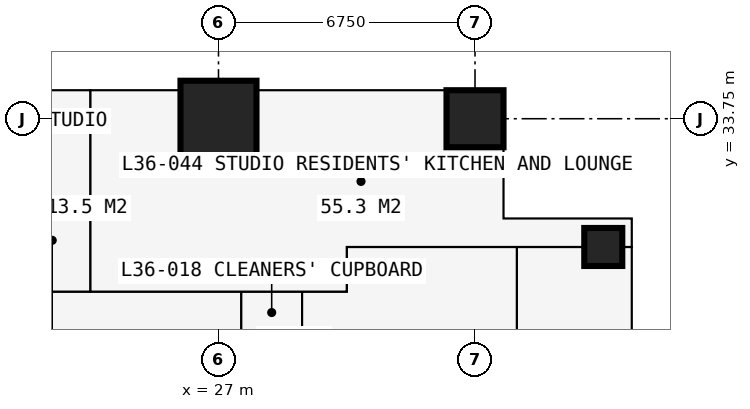
"""IFC4 building model, lengths in metres.
Left out: names, types, materials, properties, quantities, classifications, styles, units other than length and angle.
Written with IfcOpenShell. Run it as: python <this file> out.ifc"""

import sys

from ifc_helpers import new_model, si_unit, direction, frame, frame_2d, origin, origin_2d, place, context, subcontext, project, spatial, rectangle, extrude, element, fill, save


model = new_model("IFC4")
c1 = context("Model", 3, precision=1e-05, world=origin(), true_north=direction((0.0, 1.0)))
c2 = subcontext(c1, "Body", "Model", "MODEL_VIEW")
j1 = project(units=[si_unit("LENGTHUNIT", "METRE"), si_unit("PLANEANGLEUNIT", "RADIAN")], contexts=[c1])
p1 = place(None, origin())
s1 = spatial("IfcSite", under=j1, at=p1, CompositionType="ELEMENT")
p2 = place(p1, origin())
s2 = spatial("IfcBuilding", under=s1, at=p2, CompositionType="ELEMENT")
p3 = place(p2, frame((0.0, 0.0, 134.1)))
s3 = spatial("IfcBuildingStorey", under=s2, at=p3, CompositionType="ELEMENT", Elevation=134.1)
p4 = place(p3, frame((27.0, 33.75, 0.0), z_axis=(0.0, 0.0, 1.0), x_axis=(1.0, 0.0, 0.0)))
e1 = element("IfcColumn", 1, at=p4, inside=s3, PredefinedType="COLUMN", context=c2, shape_type="SweptSolid", body=[
    extrude(rectangle(XDim=2.0, YDim=2.0, at=origin_2d()), origin(), (0.0, 0.0, 1.0), 3.6),
])
p5 = place(p3, frame((33.75, 33.75, 0.0), z_axis=(0.0, 0.0, 1.0), x_axis=(1.0, 0.0, 0.0)))
e2 = element("IfcColumn", 2, at=p5, inside=s3, PredefinedType="COLUMN", context=c2, shape_type="SweptSolid", body=[
    extrude(rectangle(XDim=1.5, YDim=1.5, at=origin_2d()), origin(), (0.0, 0.0, 1.0), 3.6),
])
p6 = place(p3, frame((37.125, 30.375, 0.0), z_axis=(0.0, 0.0, 1.0), x_axis=(1.0, 0.0, 0.0)))
e3 = element("IfcColumn", 3, at=p6, inside=s3, PredefinedType="COLUMN", context=c2, shape_type="SweptSolid", body=[
    extrude(rectangle(XDim=1.0, YDim=1.0, at=origin_2d()), origin(), (0.0, 0.0, 1.0), 3.6),
])
p7 = place(p3, frame((37.875, 27.75, 0.0), z_axis=(0.0, 0.0, 1.0), x_axis=(0.0, 1.0, 0.0)))
e4 = element("IfcWall", 4, at=p7, inside=s3, PredefinedType="SOLIDWALL", context=c2, shape_type="SweptSolid", body=[
    extrude(rectangle(XDim=3.375, YDim=0.3, at=frame_2d((1.688, 0.0))), origin(), (0.0, 0.0, 1.0), 3.3),
])
p8 = place(p7, frame((0.788, 0.0, 0.6)))
e5 = element("IfcOpeningElement", 5, at=p8, cuts=e4, PredefinedType="OPENING", context=c2, shape_type="SweptSolid", body=[
    extrude(rectangle(XDim=1.8, YDim=2.1, at=frame_2d((0.9, 1.05))), frame((0.0, 0.16, 0.0), z_axis=(0.0, -1.0, 0.0), x_axis=(1.0, 0.0, 0.0)), (0.0, 0.0, 1.0), 0.32),
])
p9 = place(p3, frame((37.875, 31.125, 0.0), z_axis=(0.0, 0.0, 1.0), x_axis=(-1.0, 0.0, 0.0)))
e6 = element("IfcWall", 6, at=p9, inside=s3, PredefinedType="SOLIDWALL", context=c2, shape_type="SweptSolid", body=[
    extrude(rectangle(XDim=3.375, YDim=0.3, at=frame_2d((1.688, 0.0))), origin(), (0.0, 0.0, 1.0), 3.3),
])
p10 = place(p9, frame((0.788, 0.0, 0.6)))
e7 = element("IfcOpeningElement", 7, at=p10, cuts=e6, PredefinedType="OPENING", context=c2, shape_type="SweptSolid", body=[
    extrude(rectangle(XDim=1.8, YDim=2.1, at=frame_2d((0.9, 1.05))), frame((0.0, 0.16, 0.0), z_axis=(0.0, -1.0, 0.0), x_axis=(1.0, 0.0, 0.0)), (0.0, 0.0, 1.0), 0.32),
])
p11 = place(p3, frame((34.5, 31.125, 0.0), z_axis=(0.0, 0.0, 1.0), x_axis=(0.0, 1.0, 0.0)))
e8 = element("IfcWall", 8, at=p11, inside=s3, PredefinedType="SOLIDWALL", context=c2, shape_type="SweptSolid", body=[
    extrude(rectangle(XDim=3.375, YDim=0.3, at=frame_2d((1.688, 0.0))), origin(), (0.0, 0.0, 1.0), 3.3),
])
p12 = place(p11, frame((0.268, 0.0, 0.9)))
e9 = element("IfcOpeningElement", 9, at=p12, cuts=e8, PredefinedType="OPENING", context=c2, shape_type="SweptSolid", body=[
    extrude(rectangle(XDim=1.5, YDim=1.8, at=frame_2d((0.75, 0.9))), frame((0.0, 0.16, 0.0), z_axis=(0.0, -1.0, 0.0), x_axis=(1.0, 0.0, 0.0)), (0.0, 0.0, 1.0), 0.32),
])
p13 = place(p3, frame((20.25, 34.5, 0.0), z_axis=(0.0, 0.0, 1.0), x_axis=(1.0, 0.0, 0.0)))
e10 = element("IfcWall", 10, at=p13, inside=s3, PredefinedType="SOLIDWALL", context=c2, shape_type="SweptSolid", body=[
    extrude(rectangle(XDim=6.75, YDim=0.15, at=frame_2d((3.375, 0.0))), origin(), (0.0, 0.0, 1.0), 3.3),
])
p14 = place(p13, frame((0.863, 0.0, 0.0)))
e11 = element("IfcOpeningElement", 11, at=p14, cuts=e10, PredefinedType="OPENING", context=c2, shape_type="SweptSolid", body=[
    extrude(rectangle(XDim=1.0, YDim=2.2, at=frame_2d((0.5, 1.1))), frame((0.0, 0.085, 0.0), z_axis=(0.0, -1.0, 0.0), x_axis=(1.0, 0.0, 0.0)), (0.0, 0.0, 1.0), 0.17),
])
p15 = place(p13, frame((1.975, 0.0, 0.9)))
e12 = element("IfcOpeningElement", 12, at=p15, cuts=e10, PredefinedType="OPENING", context=c2, shape_type="SweptSolid", body=[
    extrude(rectangle(XDim=1.2, YDim=1.8, at=frame_2d((0.6, 0.9))), frame((0.0, 0.085, 0.0), z_axis=(0.0, -1.0, 0.0), x_axis=(1.0, 0.0, 0.0)), (0.0, 0.0, 1.0), 0.17),
])
p16 = place(p13, frame((4.621, 0.0, 0.0)))
e13 = element("IfcOpeningElement", 13, at=p16, cuts=e10, PredefinedType="OPENING", context=c2, shape_type="SweptSolid", body=[
    extrude(rectangle(XDim=1.0, YDim=2.2, at=frame_2d((0.5, 1.1))), frame((0.0, 0.085, 0.0), z_axis=(0.0, -1.0, 0.0), x_axis=(1.0, 0.0, 0.0)), (0.0, 0.0, 1.0), 0.17),
])
p17 = place(p13, frame((3.592, 0.0, 0.9)))
e14 = element("IfcOpeningElement", 14, at=p17, cuts=e10, PredefinedType="OPENING", context=c2, shape_type="SweptSolid", body=[
    extrude(rectangle(XDim=0.9, YDim=1.8, at=frame_2d((0.45, 0.9))), frame((0.0, 0.085, 0.0), z_axis=(0.0, -1.0, 0.0), x_axis=(1.0, 0.0, 0.0)), (0.0, 0.0, 1.0), 0.17),
])
p18 = place(p3, frame((23.625, 34.6, 0.0), z_axis=(0.0, 0.0, 1.0), x_axis=(0.0, 1.0, 0.0)))
e15 = element("IfcWall", 15, at=p18, inside=s3, PredefinedType="USERDEFINED", context=c2, shape_type="SweptSolid", body=[
    extrude(rectangle(XDim=2.2, YDim=1.0, at=frame_2d((1.1, 0.0))), origin(), (0.0, 0.0, 1.0), 0.9),
])
p19 = place(p3, frame((11.3, 29.2, 0.0), z_axis=(0.0, 0.0, 1.0), x_axis=(1.0, 0.0, 0.0)))
e16 = element("IfcWall", 16, at=p19, inside=s3, PredefinedType="PARTITIONING", context=c2, shape_type="SweptSolid", body=[
    extrude(rectangle(XDim=19.075, YDim=0.15, at=frame_2d((9.538, 0.0))), origin(), (0.0, 0.0, 1.0), 3.3),
])
p20 = place(p19, frame((5.825, 0.0, 0.0)))
e17 = element("IfcOpeningElement", 17, at=p20, cuts=e16, PredefinedType="OPENING", context=c2, shape_type="SweptSolid", body=[
    extrude(rectangle(XDim=0.95, YDim=2.2, at=frame_2d((0.475, 1.1))), frame((0.0, 0.085, 0.0), z_axis=(0.0, -1.0, 0.0), x_axis=(1.0, 0.0, 0.0)), (0.0, 0.0, 1.0), 0.17),
])
p21 = place(p19, frame((9.2, 0.0, 0.0)))
e18 = element("IfcOpeningElement", 18, at=p21, cuts=e16, PredefinedType="OPENING", context=c2, shape_type="SweptSolid", body=[
    extrude(rectangle(XDim=0.95, YDim=2.2, at=frame_2d((0.475, 1.1))), frame((0.0, 0.085, 0.0), z_axis=(0.0, -1.0, 0.0), x_axis=(1.0, 0.0, 0.0)), (0.0, 0.0, 1.0), 0.17),
])
p22 = place(p19, frame((0.6, 0.0, 0.0)))
e19 = element("IfcOpeningElement", 19, at=p22, cuts=e16, PredefinedType="OPENING", context=c2, shape_type="SweptSolid", body=[
    extrude(rectangle(XDim=1.0, YDim=2.2, at=frame_2d((0.5, 1.1))), frame((0.0, 0.085, 0.0), z_axis=(0.0, -1.0, 0.0), x_axis=(1.0, 0.0, 0.0)), (0.0, 0.0, 1.0), 0.17),
])
p23 = place(p3, frame((21.625, 31.4, 0.0), z_axis=(0.0, 0.0, 1.0), x_axis=(1.0, 0.0, 0.0)))
e20 = element("IfcWall", 20, at=p23, inside=s3, PredefinedType="PARTITIONING", context=c2, shape_type="SweptSolid", body=[
    extrude(rectangle(XDim=2.0, YDim=0.1, at=frame_2d((1.0, 0.0))), origin(), (0.0, 0.0, 1.0), 3.3),
])
p24 = place(p3, frame((23.625, 29.2, 0.0), z_axis=(0.0, 0.0, 1.0), x_axis=(0.0, 1.0, 0.0)))
e21 = element("IfcWall", 21, at=p24, inside=s3, PredefinedType="PARTITIONING", context=c2, shape_type="SweptSolid", body=[
    extrude(rectangle(XDim=5.284, YDim=0.15, at=frame_2d((2.642, 0.0))), origin(), (0.0, 0.0, 1.0), 3.3),
])
p25 = place(p3, frame((27.6, 27.6, 0.0), z_axis=(0.0, 0.0, 1.0), x_axis=(0.0, 1.0, 0.0)))
e22 = element("IfcWall", 22, at=p25, inside=s3, PredefinedType="PARTITIONING", context=c2, shape_type="SweptSolid", body=[
    extrude(rectangle(XDim=1.6, YDim=0.15, at=frame_2d((0.8, 0.0))), origin(), (0.0, 0.0, 1.0), 3.3),
])
p26 = place(p25, frame((0.3, 0.0, 0.0)))
e23 = element("IfcOpeningElement", 23, at=p26, cuts=e22, PredefinedType="OPENING", context=c2, shape_type="SweptSolid", body=[
    extrude(rectangle(XDim=0.95, YDim=2.2, at=frame_2d((0.475, 1.1))), frame((0.0, 0.085, 0.0), z_axis=(0.0, -1.0, 0.0), x_axis=(1.0, 0.0, 0.0)), (0.0, 0.0, 1.0), 0.17),
])
p27 = place(p3, frame((29.2, 11.3, 0.0), z_axis=(0.0, 0.0, 1.0), x_axis=(0.0, 1.0, 0.0)))
e24 = element("IfcWall", 24, at=p27, inside=s3, PredefinedType="PARTITIONING", context=c2, shape_type="SweptSolid", body=[
    extrude(rectangle(XDim=17.9, YDim=0.2, at=frame_2d((8.95, 0.0))), origin(), (0.0, 0.0, 1.0), 3.3),
])
p28 = place(p27, frame((8.35, 0.0, 0.0)))
e25 = element("IfcOpeningElement", 25, at=p28, cuts=e24, PredefinedType="OPENING", context=c2, shape_type="SweptSolid", body=[
    extrude(rectangle(XDim=1.2, YDim=2.2, at=frame_2d((0.6, 1.1))), frame((0.0, 0.11, 0.0), z_axis=(0.0, -1.0, 0.0), x_axis=(1.0, 0.0, 0.0)), (0.0, 0.0, 1.0), 0.22),
])
p29 = place(p3, frame((30.375, 29.2, 0.0), z_axis=(0.0, 0.0, 1.0), x_axis=(0.0, 1.0, 0.0)))
e26 = element("IfcWall", 26, at=p29, inside=s3, PredefinedType="PARTITIONING", context=c2, shape_type="SweptSolid", body=[
    extrude(rectangle(XDim=1.175, YDim=0.15, at=frame_2d((0.587, 0.0))), origin(), (0.0, 0.0, 1.0), 3.3),
])
p30 = place(p3, frame((30.375, 30.375, 0.0), z_axis=(0.0, 0.0, 1.0), x_axis=(1.0, 0.0, 0.0)))
e27 = element("IfcWall", 27, at=p30, inside=s3, PredefinedType="PARTITIONING", context=c2, shape_type="SweptSolid", body=[
    extrude(rectangle(XDim=7.35, YDim=0.15, at=frame_2d((3.675, 0.0))), origin(), (0.0, 0.0, 1.0), 2.802),
])
p31 = place(p30, frame((5.225, 0.0, 0.0)))
e28 = element("IfcOpeningElement", 28, at=p31, cuts=e27, PredefinedType="OPENING", context=c2, shape_type="SweptSolid", body=[
    extrude(rectangle(XDim=1.0, YDim=2.2, at=frame_2d((0.5, 1.1))), frame((0.0, 0.085, 0.0), z_axis=(0.0, -1.0, 0.0), x_axis=(1.0, 0.0, 0.0)), (0.0, 0.0, 1.0), 0.17),
])
p32 = place(p3, frame((34.85, 12.55, 0.0), z_axis=(0.0, 0.0, 1.0), x_axis=(0.0, 1.0, 0.0)))
e29 = element("IfcWall", 29, at=p32, inside=s3, PredefinedType="PARTITIONING", context=c2, shape_type="SweptSolid", body=[
    extrude(rectangle(XDim=17.825, YDim=0.15, at=frame_2d((8.913, 0.0))), origin(), (0.0, 0.0, 1.0), 3.3),
])
p33 = place(p32, frame((8.5, 0.0, 0.0)))
e30 = element("IfcOpeningElement", 30, at=p33, cuts=e29, PredefinedType="OPENING", context=c2, shape_type="SweptSolid", body=[
    extrude(rectangle(XDim=0.95, YDim=2.2, at=frame_2d((0.475, 1.1))), frame((0.0, 0.085, 0.0), z_axis=(0.0, -1.0, 0.0), x_axis=(1.0, 0.0, 0.0)), (0.0, 0.0, 1.0), 0.17),
])
p34 = place(p8, origin())
e31 = element("IfcWindow", 31, at=p34, inside=s3, PartitioningType="SINGLE_PANEL", PredefinedType="WINDOW", context=c2, shape_type="SweptSolid", body=[
    extrude(rectangle(XDim=1.8, YDim=2.1, at=frame_2d((0.9, 1.05))), frame((0.0, 0.03, 0.0), z_axis=(0.0, -1.0, 0.0), x_axis=(1.0, 0.0, 0.0)), (0.0, 0.0, 1.0), 0.06),
])
fill(e5, e31)
p35 = place(p10, origin())
e32 = element("IfcWindow", 32, at=p35, inside=s3, PartitioningType="SINGLE_PANEL", PredefinedType="WINDOW", context=c2, shape_type="SweptSolid", body=[
    extrude(rectangle(XDim=1.8, YDim=2.1, at=frame_2d((0.9, 1.05))), frame((0.0, 0.03, 0.0), z_axis=(0.0, -1.0, 0.0), x_axis=(1.0, 0.0, 0.0)), (0.0, 0.0, 1.0), 0.06),
])
fill(e7, e32)
p36 = place(p12, origin())
e33 = element("IfcWindow", 33, at=p36, inside=s3, PartitioningType="SINGLE_PANEL", PredefinedType="WINDOW", context=c2, shape_type="SweptSolid", body=[
    extrude(rectangle(XDim=1.5, YDim=1.8, at=frame_2d((0.75, 0.9))), frame((0.0, 0.03, 0.0), z_axis=(0.0, -1.0, 0.0), x_axis=(1.0, 0.0, 0.0)), (0.0, 0.0, 1.0), 0.06),
])
fill(e9, e33)
p37 = place(p15, origin())
e34 = element("IfcWindow", 34, at=p37, inside=s3, PartitioningType="SINGLE_PANEL", PredefinedType="WINDOW", context=c2, shape_type="SweptSolid", body=[
    extrude(rectangle(XDim=1.2, YDim=1.8, at=frame_2d((0.6, 0.9))), frame((0.0, 0.03, 0.0), z_axis=(0.0, -1.0, 0.0), x_axis=(1.0, 0.0, 0.0)), (0.0, 0.0, 1.0), 0.06),
])
fill(e12, e34)
p38 = place(p16, origin())
e35 = element("IfcDoor", 35, at=p38, inside=s3, OperationType="SINGLE_SWING_RIGHT", PredefinedType="DOOR", context=c2, shape_type="SweptSolid", body=[
    extrude(rectangle(XDim=1.0, YDim=2.2, at=frame_2d((0.5, 1.1))), frame((0.0, 0.025, 0.0), z_axis=(0.0, -1.0, 0.0), x_axis=(1.0, 0.0, 0.0)), (0.0, 0.0, 1.0), 0.05),
])
fill(e13, e35)
p39 = place(p17, origin())
e36 = element("IfcWindow", 36, at=p39, inside=s3, PartitioningType="SINGLE_PANEL", PredefinedType="WINDOW", context=c2, shape_type="SweptSolid", body=[
    extrude(rectangle(XDim=0.9, YDim=1.8, at=frame_2d((0.45, 0.9))), frame((0.0, 0.03, 0.0), z_axis=(0.0, -1.0, 0.0), x_axis=(1.0, 0.0, 0.0)), (0.0, 0.0, 1.0), 0.06),
])
fill(e14, e36)
p40 = place(p26, origin())
e37 = element("IfcDoor", 37, at=p40, inside=s3, OperationType="SINGLE_SWING_LEFT", PredefinedType="DOOR", context=c2, shape_type="SweptSolid", body=[
    extrude(rectangle(XDim=0.95, YDim=2.2, at=frame_2d((0.475, 1.1))), frame((0.0, 0.025, 0.0), z_axis=(0.0, -1.0, 0.0), x_axis=(1.0, 0.0, 0.0)), (0.0, 0.0, 1.0), 0.05),
])
fill(e23, e37)
p41 = place(p31, origin())
e38 = element("IfcDoor", 38, at=p41, inside=s3, OperationType="SINGLE_SWING_LEFT", PredefinedType="DOOR", context=c2, shape_type="SweptSolid", body=[
    extrude(rectangle(XDim=1.0, YDim=2.2, at=frame_2d((0.5, 1.1))), frame((0.0, 0.025, 0.0), z_axis=(0.0, -1.0, 0.0), x_axis=(1.0, 0.0, 0.0)), (0.0, 0.0, 1.0), 0.05),
])
fill(e28, e38)
save(model, sys.argv[1])
